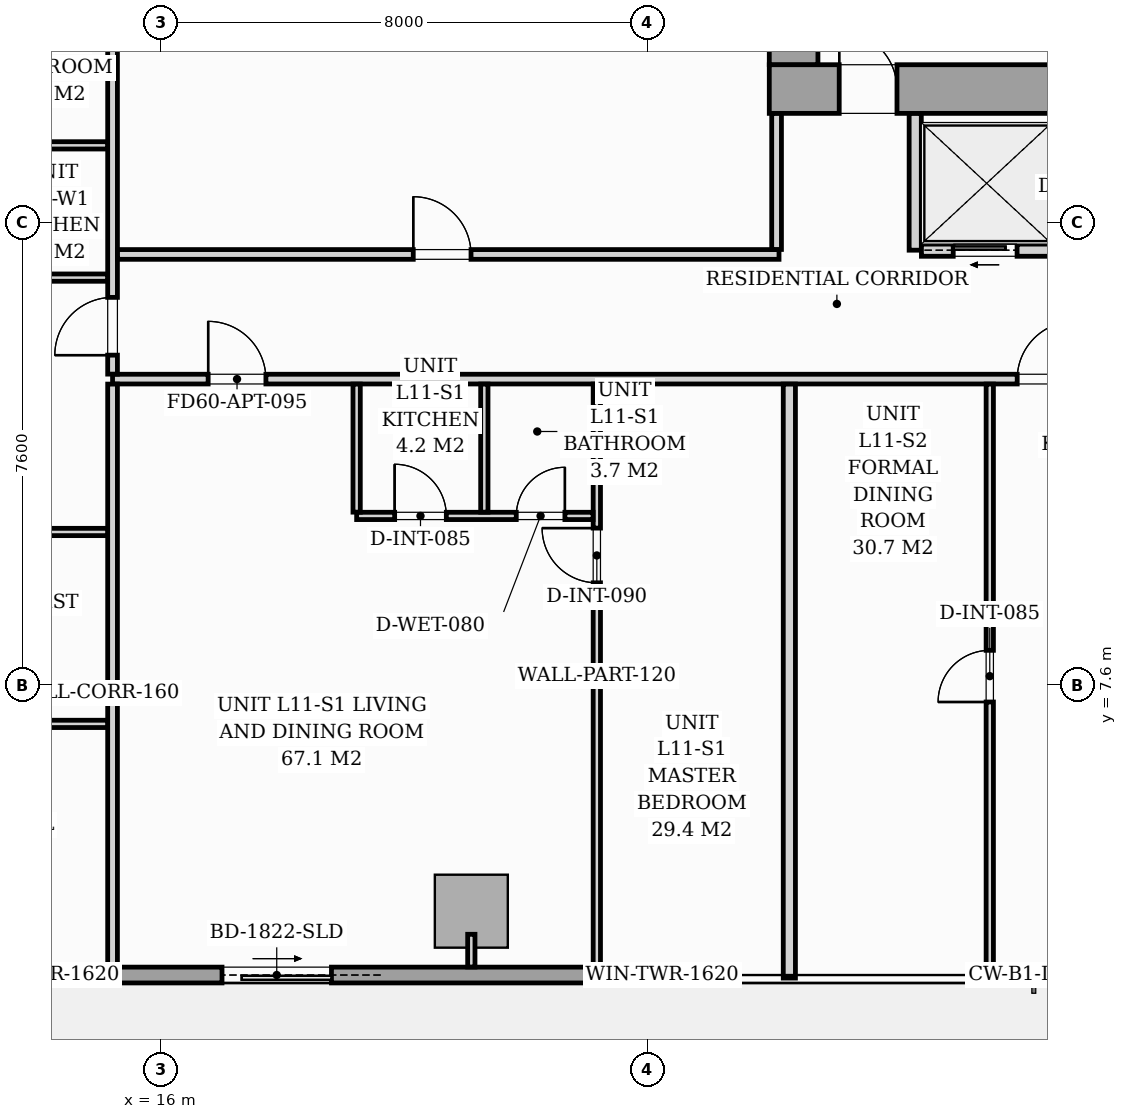
"""IFC4 building model, lengths in metres.
Left out: names, types, materials, properties, quantities, classifications, styles, units other than length and angle.
Written with IfcOpenShell. Run it as: python <this file> out.ifc"""

import sys

from ifc_helpers import new_model, si_unit, direction, frame, frame_2d, origin, origin_2d, place, context, subcontext, project, spatial, rectangle, i_section, extrude, source, transform, mapped, element, fill, save


model = new_model("IFC4")
c1 = context("Model", 3, precision=1e-05, world=origin(), true_north=direction((0.0, 1.0)))
c2 = subcontext(c1, "Body", "Model", "MODEL_VIEW")
j1 = project(units=[si_unit("LENGTHUNIT", "METRE"), si_unit("PLANEANGLEUNIT", "RADIAN")], contexts=[c1])
p1 = place(None, origin())
s1 = spatial("IfcSite", under=j1, at=p1, CompositionType="ELEMENT")
p2 = place(p1, origin())
s2 = spatial("IfcBuilding", under=s1, at=p2, CompositionType="ELEMENT")
p3 = place(p2, frame((0.0, 0.0, 42.2)))
s3 = spatial("IfcBuildingStorey", under=s2, at=p3, CompositionType="ELEMENT", Elevation=42.2)
m1 = source(origin(), c2, "Body", "SweptSolid", [
    extrude(i_section(OverallWidth=0.437, OverallDepth=0.514, WebThickness=0.061, FlangeThickness=0.097, FilletRadius=0.018, at=origin_2d()), origin(), (0.0, 0.0, 1.0), 3.196),
])
p4 = place(p3, frame((26.4, 17.4, 0.002), z_axis=(0.0, 0.0, 1.0), x_axis=(1.0, 0.0, 0.0)))
e1 = element("IfcColumn", 1, at=p4, inside=s3, PredefinedType="PILASTER", context=c2, shape_type="MappedRepresentation", body=[
    mapped(m1, transform((0.0, 0.0, 0.0), scale=1.0)),
])
m2 = source(origin(), c2, "Body", "SweptSolid", [
    extrude(rectangle(XDim=1.2, YDim=1.2, at=origin_2d()), origin(), (0.0, 0.0, 1.0), 3.196),
])
p5 = place(p3, frame((21.1, 3.88, 0.002), z_axis=(0.0, 0.0, 1.0), x_axis=(1.0, 0.0, 0.0)))
e2 = element("IfcColumn", 2, at=p5, inside=s3, PredefinedType="COLUMN", context=c2, shape_type="MappedRepresentation", body=[
    mapped(m2, transform((0.0, 0.0, 0.0), scale=1.0)),
])
p6 = place(p3, frame((25.45, 2.83, 0.0), z_axis=(0.0, 0.0, 1.0), x_axis=(-1.0, 0.0, 0.0)))
e3 = element("IfcWall", 3, at=p6, inside=s3, PredefinedType="STANDARD", context=c2, shape_type="SweptSolid", body=[
    extrude(rectangle(XDim=17.15, YDim=0.26, at=frame_2d((8.575, 0.0))), origin(), (0.0, 0.0, 1.0), 2.94),
])
p7 = place(p6, frame((6.65, 0.0, 0.0)))
e4 = element("IfcOpeningElement", 4, at=p7, cuts=e3, PredefinedType="OPENING", context=c2, shape_type="SweptSolid", body=[
    extrude(rectangle(XDim=1.8, YDim=2.06, at=frame_2d((0.9, 1.03))), frame((0.0, 0.14, 0.0), z_axis=(0.0, -1.0, 0.0), x_axis=(1.0, 0.0, 0.0)), (0.0, 0.0, 1.0), 0.28),
])
p8 = place(p6, frame((10.6, 0.0, 0.65)))
e5 = element("IfcOpeningElement", 5, at=p8, cuts=e3, PredefinedType="OPENING", context=c2, shape_type="SweptSolid", body=[
    extrude(rectangle(XDim=1.6, YDim=1.5, at=frame_2d((0.8, 0.75))), frame((0.0, 0.14, 0.0), z_axis=(0.0, -1.0, 0.0), x_axis=(1.0, 0.0, 0.0)), (0.0, 0.0, 1.0), 0.28),
])
p9 = place(p6, frame((0.413, 0.0, 0.75)))
e6 = element("IfcOpeningElement", 6, at=p9, cuts=e3, PredefinedType="OPENING", context=c2, shape_type="SweptSolid", body=[
    extrude(rectangle(XDim=1.6, YDim=1.5, at=frame_2d((0.8, 0.75))), frame((0.0, 0.14, 0.0), z_axis=(0.0, -1.0, 0.0), x_axis=(1.0, 0.0, 0.0)), (0.0, 0.0, 1.0), 0.28),
])
p10 = place(p3, frame((26.0, 17.4, 0.0), z_axis=(0.0, 0.0, 1.0), x_axis=(1.0, 0.0, 0.0)))
e7 = element("IfcWall", 7, at=p10, inside=s3, PredefinedType="SHEAR", context=c2, shape_type="SweptSolid", body=[
    extrude(rectangle(XDim=20.0, YDim=0.8, at=frame_2d((10.0, 0.0))), origin(), (0.0, 0.0, 1.0), 3.2),
])
p11 = place(p10, frame((1.15, 0.0, 0.0)))
e8 = element("IfcOpeningElement", 8, at=p11, cuts=e7, PredefinedType="OPENING", context=c2, shape_type="SweptSolid", body=[
    extrude(rectangle(XDim=0.95, YDim=2.06, at=frame_2d((0.475, 1.03))), frame((0.0, 0.41, 0.0), z_axis=(0.0, -1.0, 0.0), x_axis=(1.0, 0.0, 0.0)), (0.0, 0.0, 1.0), 0.82),
])
p12 = place(p10, frame((9.58, 0.0, 0.0)))
e9 = element("IfcOpeningElement", 9, at=p12, cuts=e7, PredefinedType="OPENING", context=c2, shape_type="SweptSolid", body=[
    extrude(rectangle(XDim=0.85, YDim=2.0, at=frame_2d((0.425, 1.0))), frame((0.0, 0.41, 0.0), z_axis=(0.0, -1.0, 0.0), x_axis=(1.0, 0.0, 0.0)), (0.0, 0.0, 1.0), 0.82),
])
p13 = place(p10, frame((17.75, 0.0, 0.0)))
e10 = element("IfcOpeningElement", 10, at=p13, cuts=e7, PredefinedType="OPENING", context=c2, shape_type="SweptSolid", body=[
    extrude(rectangle(XDim=0.95, YDim=2.06, at=frame_2d((0.475, 1.03))), frame((0.0, 0.41, 0.0), z_axis=(0.0, -1.0, 0.0), x_axis=(1.0, 0.0, 0.0)), (0.0, 0.0, 1.0), 0.82),
])
p14 = place(p3, frame((26.4, 17.802, 0.0), z_axis=(0.0, 0.0, 1.0), x_axis=(0.0, 1.0, 0.0)))
e11 = element("IfcWall", 11, at=p14, inside=s3, PredefinedType="SHEAR", context=c2, shape_type="SweptSolid", body=[
    extrude(rectangle(XDim=5.796, YDim=0.8, at=frame_2d((2.898, 0.0))), origin(), (0.0, 0.0, 1.0), 3.2),
])
p15 = place(p3, frame((28.4, 14.75, 0.0), z_axis=(0.0, 0.0, 1.0), x_axis=(0.0, 1.0, 0.0)))
e12 = element("IfcWall", 12, at=p15, inside=s3, PredefinedType="PARTITIONING", context=c2, shape_type="SweptSolid", body=[
    extrude(rectangle(XDim=2.248, YDim=0.2, at=frame_2d((1.124, 0.0))), origin(), (0.0, 0.0, 1.0), 2.94),
])
p16 = place(p3, frame((28.502, 14.75, 0.0), z_axis=(0.0, 0.0, 1.0), x_axis=(1.0, 0.0, 0.0)))
e13 = element("IfcWall", 13, at=p16, inside=s3, PredefinedType="PARTITIONING", context=c2, shape_type="SweptSolid", body=[
    extrude(rectangle(XDim=2.146, YDim=0.2, at=frame_2d((1.073, 0.0))), origin(), (0.0, 0.0, 1.0), 2.94),
])
p17 = place(p16, frame((0.523, 0.0, 0.0)))
e14 = element("IfcOpeningElement", 14, at=p17, cuts=e13, PredefinedType="OPENING", context=c2, shape_type="SweptSolid", body=[
    extrude(rectangle(XDim=1.05, YDim=2.08, at=frame_2d((0.525, 1.04))), frame((0.0, 0.11, 0.0), z_axis=(0.0, -1.0, 0.0), x_axis=(1.0, 0.0, 0.0)), (0.0, 0.0, 1.0), 0.22),
])
p18 = place(p3, frame((15.2, 12.63, 0.0), z_axis=(0.0, 0.0, 1.0), x_axis=(1.0, 0.0, 0.0)))
e15 = element("IfcWall", 15, at=p18, inside=s3, PredefinedType="PARTITIONING", context=c2, shape_type="SweptSolid", body=[
    extrude(rectangle(XDim=37.1, YDim=0.16, at=frame_2d((18.55, 0.0))), origin(), (0.0, 0.0, 1.0), 2.94),
])
p19 = place(p18, frame((1.572, 0.0, 0.0)))
e16 = element("IfcOpeningElement", 16, at=p19, cuts=e15, PredefinedType="OPENING", context=c2, shape_type="SweptSolid", body=[
    extrude(rectangle(XDim=0.95, YDim=2.06, at=frame_2d((0.475, 1.03))), frame((0.0, 0.09, 0.0), z_axis=(0.0, -1.0, 0.0), x_axis=(1.0, 0.0, 0.0)), (0.0, 0.0, 1.0), 0.18),
])
p20 = place(p18, frame((14.877, 0.0, 0.0)))
e17 = element("IfcOpeningElement", 17, at=p20, cuts=e15, PredefinedType="OPENING", context=c2, shape_type="SweptSolid", body=[
    extrude(rectangle(XDim=0.95, YDim=2.06, at=frame_2d((0.475, 1.03))), frame((0.0, 0.09, 0.0), z_axis=(0.0, -1.0, 0.0), x_axis=(1.0, 0.0, 0.0)), (0.0, 0.0, 1.0), 0.18),
])
p21 = place(p18, frame((28.476, 0.0, 0.0)))
e18 = element("IfcOpeningElement", 18, at=p21, cuts=e15, PredefinedType="OPENING", context=c2, shape_type="SweptSolid", body=[
    extrude(rectangle(XDim=0.95, YDim=2.06, at=frame_2d((0.475, 1.03))), frame((0.0, 0.09, 0.0), z_axis=(0.0, -1.0, 0.0), x_axis=(1.0, 0.0, 0.0)), (0.0, 0.0, 1.0), 0.18),
])
p22 = place(p3, frame((15.2, 2.962, 0.0), z_axis=(0.0, 0.0, 1.0), x_axis=(0.0, 1.0, 0.0)))
e19 = element("IfcWall", 19, at=p22, inside=s3, PredefinedType="PARTITIONING", context=c2, shape_type="SweptSolid", body=[
    extrude(rectangle(XDim=9.586, YDim=0.16, at=frame_2d((4.793, 0.0))), origin(), (0.0, 0.0, 1.0), 2.94),
])
p23 = place(p3, frame((15.2, 12.712, 0.0), z_axis=(0.0, 0.0, 1.0), x_axis=(0.0, 1.0, 0.0)))
e20 = element("IfcWall", 20, at=p23, inside=s3, PredefinedType="PARTITIONING", context=c2, shape_type="SweptSolid", body=[
    extrude(rectangle(XDim=14.726, YDim=0.16, at=frame_2d((7.363, 0.0))), origin(), (0.0, 0.0, 1.0), 2.94),
])
p24 = place(p23, frame((0.312, 0.0, 0.0)))
e21 = element("IfcOpeningElement", 21, at=p24, cuts=e20, PredefinedType="OPENING", context=c2, shape_type="SweptSolid", body=[
    extrude(rectangle(XDim=0.95, YDim=2.06, at=frame_2d((0.475, 1.03))), frame((0.0, 0.09, 0.0), z_axis=(0.0, -1.0, 0.0), x_axis=(1.0, 0.0, 0.0)), (0.0, 0.0, 1.0), 0.18),
])
p25 = place(p3, frame((23.164, 2.962, 0.0), z_axis=(0.0, 0.0, 1.0), x_axis=(0.0, 1.0, 0.0)))
e22 = element("IfcWall", 22, at=p25, inside=s3, PredefinedType="PARTITIONING", context=c2, shape_type="SweptSolid", body=[
    extrude(rectangle(XDim=9.586, YDim=0.12, at=frame_2d((4.793, 0.0))), origin(), (0.0, 0.0, 1.0), 2.94),
])
p26 = place(p25, frame((6.318, 0.0, 0.0)))
e23 = element("IfcOpeningElement", 23, at=p26, cuts=e22, PredefinedType="OPENING", context=c2, shape_type="SweptSolid", body=[
    extrude(rectangle(XDim=0.9, YDim=2.05, at=frame_2d((0.45, 1.025))), frame((0.0, 0.07, 0.0), z_axis=(0.0, -1.0, 0.0), x_axis=(1.0, 0.0, 0.0)), (0.0, 0.0, 1.0), 0.14),
])
p27 = place(p3, frame((19.214, 10.38, 0.0), z_axis=(0.0, 0.0, 1.0), x_axis=(1.0, 0.0, 0.0)))
e24 = element("IfcWall", 24, at=p27, inside=s3, PredefinedType="PARTITIONING", context=c2, shape_type="SweptSolid", body=[
    extrude(rectangle(XDim=3.888, YDim=0.12, at=frame_2d((1.944, 0.0))), origin(), (0.0, 0.0, 1.0), 2.94),
])
p28 = place(p27, frame((0.625, 0.0, 0.0)))
e25 = element("IfcOpeningElement", 25, at=p28, cuts=e24, PredefinedType="OPENING", context=c2, shape_type="SweptSolid", body=[
    extrude(rectangle(XDim=0.85, YDim=2.05, at=frame_2d((0.425, 1.025))), frame((0.0, 0.07, 0.0), z_axis=(0.0, -1.0, 0.0), x_axis=(1.0, 0.0, 0.0)), (0.0, 0.0, 1.0), 0.14),
])
p29 = place(p27, frame((2.625, 0.0, 0.0)))
e26 = element("IfcOpeningElement", 26, at=p29, cuts=e24, PredefinedType="OPENING", context=c2, shape_type="SweptSolid", body=[
    extrude(rectangle(XDim=0.8, YDim=2.02, at=frame_2d((0.4, 1.01))), frame((0.0, 0.07, 0.0), z_axis=(0.0, -1.0, 0.0), x_axis=(1.0, 0.0, 0.0)), (0.0, 0.0, 1.0), 0.14),
])
for number, where, z_axis, x_axis in (
    (27, (21.314, 10.442, 0.0), (0.0, 0.0, 1.0), (0.0, 1.0, 0.0)),
    (28, (19.214, 10.442, 0.0), (0.0, 0.0, 1.0), (0.0, 1.0, 0.0)),
):
    element("IfcWall", number, at=place(p3, frame(where, z_axis=z_axis, x_axis=x_axis)), inside=s3, PredefinedType="PARTITIONING", context=c2, shape_type="SweptSolid", body=[
        extrude(rectangle(XDim=2.106, YDim=0.12, at=frame_2d((1.053, 0.0))), origin(), (0.0, 0.0, 1.0), 2.94),
    ])
p30 = place(p3, frame((26.33, 2.78, 0.0), z_axis=(0.0, 0.0, 1.0), x_axis=(0.0, 1.0, 0.0)))
e29 = element("IfcWall", 29, at=p30, inside=s3, PredefinedType="PARTITIONING", context=c2, shape_type="SweptSolid", body=[
    extrude(rectangle(XDim=9.768, YDim=0.2, at=frame_2d((4.884, 0.0))), origin(), (0.0, 0.0, 1.0), 2.94),
])
p31 = place(p3, frame((29.626, 2.78, 0.0), z_axis=(0.0, 0.0, 1.0), x_axis=(0.0, 1.0, 0.0)))
e30 = element("IfcWall", 30, at=p31, inside=s3, PredefinedType="PARTITIONING", context=c2, shape_type="SweptSolid", body=[
    extrude(rectangle(XDim=9.768, YDim=0.12, at=frame_2d((4.884, 0.0))), origin(), (0.0, 0.0, 1.0), 2.94),
])
p32 = place(p31, frame((4.54, 0.0, 0.0)))
e31 = element("IfcOpeningElement", 31, at=p32, cuts=e30, PredefinedType="OPENING", context=c2, shape_type="SweptSolid", body=[
    extrude(rectangle(XDim=0.85, YDim=2.05, at=frame_2d((0.425, 1.025))), frame((0.0, 0.07, 0.0), z_axis=(0.0, -1.0, 0.0), x_axis=(1.0, 0.0, 0.0)), (0.0, 0.0, 1.0), 0.14),
])
for number, where, z_axis, x_axis in (
    (32, (12.862, 16.474, 0.0), (0.0, 0.0, 1.0), (1.0, 0.0, 0.0)),
    (33, (12.862, 14.299, 0.0), (0.0, 0.0, 1.0), (1.0, 0.0, 0.0)),
):
    element("IfcWall", number, at=place(p3, frame(where, z_axis=z_axis, x_axis=x_axis)), inside=s3, PredefinedType="PARTITIONING", context=c2, shape_type="SweptSolid", body=[
        extrude(rectangle(XDim=2.256, YDim=0.12, at=frame_2d((1.128, 0.0))), origin(), (0.0, 0.0, 1.0), 2.94),
    ])
p33 = place(p3, frame((5.88, 6.96, 0.0), z_axis=(0.0, 0.0, 1.0), x_axis=(1.0, 0.0, 0.0)))
e34 = element("IfcWall", 34, at=p33, inside=s3, PredefinedType="PARTITIONING", context=c2, shape_type="SweptSolid", body=[
    extrude(rectangle(XDim=9.238, YDim=0.12, at=frame_2d((4.619, 0.0))), origin(), (0.0, 0.0, 1.0), 2.94),
])
p34 = place(p33, frame((4.185, 0.0, 0.0)))
e35 = element("IfcOpeningElement", 35, at=p34, cuts=e34, PredefinedType="OPENING", context=c2, shape_type="SweptSolid", body=[
    extrude(rectangle(XDim=0.85, YDim=2.05, at=frame_2d((0.425, 1.025))), frame((0.0, 0.07, 0.0), z_axis=(0.0, -1.0, 0.0), x_axis=(1.0, 0.0, 0.0)), (0.0, 0.0, 1.0), 0.14),
])
p35 = place(p3, frame((5.88, 10.116, 0.0), z_axis=(0.0, 0.0, 1.0), x_axis=(1.0, 0.0, 0.0)))
e36 = element("IfcWall", 36, at=p35, inside=s3, PredefinedType="PARTITIONING", context=c2, shape_type="SweptSolid", body=[
    extrude(rectangle(XDim=9.238, YDim=0.12, at=frame_2d((4.619, 0.0))), origin(), (0.0, 0.0, 1.0), 2.94),
])
p36 = place(p35, frame((4.185, 0.0, 0.0)))
e37 = element("IfcOpeningElement", 37, at=p36, cuts=e36, PredefinedType="OPENING", context=c2, shape_type="SweptSolid", body=[
    extrude(rectangle(XDim=0.85, YDim=2.05, at=frame_2d((0.425, 1.025))), frame((0.0, 0.07, 0.0), z_axis=(0.0, -1.0, 0.0), x_axis=(1.0, 0.0, 0.0)), (0.0, 0.0, 1.0), 0.14),
])
p37 = place(p3, frame((15.282, 14.68, 0.0), z_axis=(0.0, 0.0, 1.0), x_axis=(1.0, 0.0, 0.0)))
e38 = element("IfcWall", 38, at=p37, inside=s3, PredefinedType="PARTITIONING", context=c2, shape_type="SweptSolid", body=[
    extrude(rectangle(XDim=10.878, YDim=0.16, at=frame_2d((5.439, 0.0))), origin(), (0.0, 0.0, 1.0), 2.94),
])
p38 = place(p37, frame((4.863, 0.0, 0.0)))
e39 = element("IfcOpeningElement", 39, at=p38, cuts=e38, PredefinedType="OPENING", context=c2, shape_type="SweptSolid", body=[
    extrude(rectangle(XDim=0.95, YDim=2.06, at=frame_2d((0.475, 1.03))), frame((0.0, 0.09, 0.0), z_axis=(0.0, -1.0, 0.0), x_axis=(1.0, 0.0, 0.0)), (0.0, 0.0, 1.0), 0.18),
])
p39 = place(p3, frame((26.12, 14.762, 0.0), z_axis=(0.0, 0.0, 1.0), x_axis=(0.0, 1.0, 0.0)))
e40 = element("IfcWall", 40, at=p39, inside=s3, PredefinedType="PARTITIONING", context=c2, shape_type="SweptSolid", body=[
    extrude(rectangle(XDim=2.236, YDim=0.16, at=frame_2d((1.118, 0.0))), origin(), (0.0, 0.0, 1.0), 2.94),
])
p40 = place(p3, frame((21.1, 3.5, 0.0), z_axis=(0.0, 0.0, 1.0), x_axis=(0.0, -1.0, 0.0)))
e41 = element("IfcWall", 41, at=p40, inside=s3, PredefinedType="PARTITIONING", context=c2, shape_type="SweptSolid", body=[
    extrude(rectangle(XDim=0.538, YDim=0.12, at=frame_2d((0.269, 0.0))), origin(), (0.0, 0.0, 1.0), 2.94),
])
m3 = source(origin(), c2, "Body", "SweptSolid", [
    extrude(rectangle(XDim=1.8, YDim=2.06, at=frame_2d((0.9, 1.03))), frame((0.0, 0.025, 0.0), z_axis=(0.0, -1.0, 0.0), x_axis=(1.0, 0.0, 0.0)), (0.0, 0.0, 1.0), 0.05),
])
p41 = place(p7, origin())
e42 = element("IfcDoor", 42, at=p41, inside=s3, OperationType="SLIDING_TO_LEFT", PredefinedType="DOOR", context=c2, shape_type="MappedRepresentation", body=[
    mapped(m3, transform((0.0, 0.0, 0.0), scale=1.0)),
])
fill(e4, e42)
m4 = source(origin(), c2, "Body", "SweptSolid", [
    extrude(rectangle(XDim=1.6, YDim=1.5, at=frame_2d((0.8, 0.75))), frame((0.0, 0.03, 0.0), z_axis=(0.0, -1.0, 0.0), x_axis=(1.0, 0.0, 0.0)), (0.0, 0.0, 1.0), 0.06),
])
p42 = place(p8, origin())
e43 = element("IfcWindow", 43, at=p42, inside=s3, PartitioningType="SINGLE_PANEL", PredefinedType="WINDOW", context=c2, shape_type="MappedRepresentation", body=[
    mapped(m4, transform((0.0, 0.0, 0.0), scale=1.0)),
])
fill(e5, e43)
p43 = place(p9, origin())
e44 = element("IfcWindow", 44, at=p43, inside=s3, PartitioningType="SINGLE_PANEL", PredefinedType="WINDOW", context=c2, shape_type="MappedRepresentation", body=[
    mapped(m4, transform((0.0, 0.0, 0.0), scale=1.0)),
])
fill(e6, e44)
m5 = source(origin(), c2, "Body", "SweptSolid", [
    extrude(rectangle(XDim=0.95, YDim=2.06, at=frame_2d((0.475, 1.03))), frame((0.0, 0.025, 0.0), z_axis=(0.0, -1.0, 0.0), x_axis=(1.0, 0.0, 0.0)), (0.0, 0.0, 1.0), 0.05),
])
p44 = place(p11, origin())
e45 = element("IfcDoor", 45, at=p44, inside=s3, OperationType="SINGLE_SWING_LEFT", PredefinedType="DOOR", context=c2, shape_type="MappedRepresentation", body=[
    mapped(m5, transform((0.0, 0.0, 0.0), scale=1.0)),
])
fill(e8, e45)
m6 = source(origin(), c2, "Body", "SweptSolid", [
    extrude(rectangle(XDim=1.05, YDim=2.08, at=frame_2d((0.525, 1.04))), frame((0.0, 0.025, 0.0), z_axis=(0.0, -1.0, 0.0), x_axis=(1.0, 0.0, 0.0)), (0.0, 0.0, 1.0), 0.05),
])
p45 = place(p17, origin())
e46 = element("IfcDoor", 46, at=p45, inside=s3, OperationType="SLIDING_TO_LEFT", PredefinedType="DOOR", context=c2, shape_type="MappedRepresentation", body=[
    mapped(m6, transform((0.0, 0.0, 0.0), scale=1.0)),
])
fill(e14, e46)
m7 = source(origin(), c2, "Body", "SweptSolid", [
    extrude(rectangle(XDim=0.95, YDim=2.06, at=frame_2d((0.475, 1.03))), frame((0.0, 0.025, 0.0), z_axis=(0.0, -1.0, 0.0), x_axis=(1.0, 0.0, 0.0)), (0.0, 0.0, 1.0), 0.05),
])
p46 = place(p19, origin())
e47 = element("IfcDoor", 47, at=p46, inside=s3, OperationType="SINGLE_SWING_LEFT", PredefinedType="DOOR", context=c2, shape_type="MappedRepresentation", body=[
    mapped(m7, transform((0.0, 0.0, 0.0), scale=1.0)),
])
fill(e16, e47)
m8 = source(origin(), c2, "Body", "SweptSolid", [
    extrude(rectangle(XDim=0.9, YDim=2.05, at=frame_2d((0.45, 1.025))), frame((0.0, 0.025, 0.0), z_axis=(0.0, -1.0, 0.0), x_axis=(1.0, 0.0, 0.0)), (0.0, 0.0, 1.0), 0.05),
])
p47 = place(p26, origin())
e48 = element("IfcDoor", 48, at=p47, inside=s3, OperationType="SINGLE_SWING_RIGHT", PredefinedType="DOOR", context=c2, shape_type="MappedRepresentation", body=[
    mapped(m8, transform((0.0, 0.0, 0.0), scale=1.0)),
])
fill(e23, e48)
m9 = source(origin(), c2, "Body", "SweptSolid", [
    extrude(rectangle(XDim=0.85, YDim=2.05, at=frame_2d((0.425, 1.025))), frame((0.0, 0.025, 0.0), z_axis=(0.0, -1.0, 0.0), x_axis=(1.0, 0.0, 0.0)), (0.0, 0.0, 1.0), 0.05),
])
p48 = place(p28, origin())
e49 = element("IfcDoor", 49, at=p48, inside=s3, OperationType="SINGLE_SWING_LEFT", PredefinedType="DOOR", context=c2, shape_type="MappedRepresentation", body=[
    mapped(m9, transform((0.0, 0.0, 0.0), scale=1.0)),
])
fill(e25, e49)
m10 = source(origin(), c2, "Body", "SweptSolid", [
    extrude(rectangle(XDim=0.8, YDim=2.02, at=frame_2d((0.4, 1.01))), frame((0.0, 0.025, 0.0), z_axis=(0.0, -1.0, 0.0), x_axis=(1.0, 0.0, 0.0)), (0.0, 0.0, 1.0), 0.05),
])
p49 = place(p29, origin())
e50 = element("IfcDoor", 50, at=p49, inside=s3, OperationType="SINGLE_SWING_RIGHT", PredefinedType="DOOR", context=c2, shape_type="MappedRepresentation", body=[
    mapped(m10, transform((0.0, 0.0, 0.0), scale=1.0)),
])
fill(e26, e50)
p50 = place(p32, origin())
e51 = element("IfcDoor", 51, at=p50, inside=s3, OperationType="SINGLE_SWING_LEFT", PredefinedType="DOOR", context=c2, shape_type="MappedRepresentation", body=[
    mapped(m9, transform((0.0, 0.0, 0.0), scale=1.0)),
])
fill(e31, e51)
p51 = place(p20, origin())
e52 = element("IfcDoor", 52, at=p51, inside=s3, OperationType="SINGLE_SWING_RIGHT", PredefinedType="DOOR", context=c2, shape_type="MappedRepresentation", body=[
    mapped(m7, transform((0.0, 0.0, 0.0), scale=1.0)),
])
fill(e17, e52)
p52 = place(p24, origin())
e53 = element("IfcDoor", 53, at=p52, inside=s3, OperationType="SINGLE_SWING_LEFT", PredefinedType="DOOR", context=c2, shape_type="MappedRepresentation", body=[
    mapped(m7, transform((0.0, 0.0, 0.0), scale=1.0)),
])
fill(e21, e53)
p53 = place(p38, origin())
e54 = element("IfcDoor", 54, at=p53, inside=s3, OperationType="SINGLE_SWING_LEFT", PredefinedType="DOOR", context=c2, shape_type="MappedRepresentation", body=[
    mapped(m7, transform((0.0, 0.0, 0.0), scale=1.0)),
])
fill(e39, e54)
save(model, sys.argv[1])
